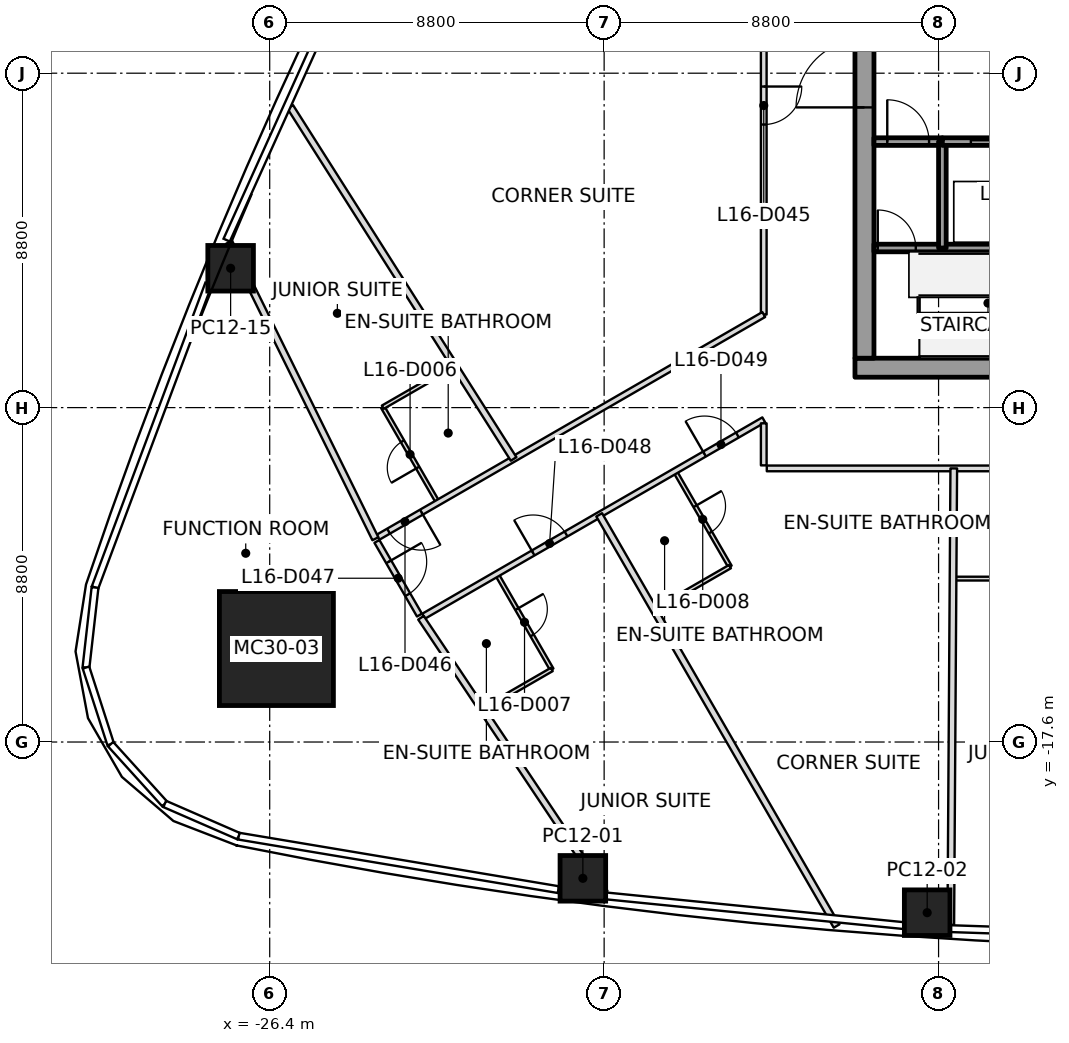
"""IFC4 building model, lengths in metres.
Left out: names, types, materials, properties, quantities, classifications, styles, units other than length and angle.
Written with IfcOpenShell. Run it as: python <this file> out.ifc"""

import sys

from ifc_helpers import new_model, si_unit, direction, frame, frame_2d, origin, origin_2d, place, context, subcontext, project, spatial, rectangle, extrude, clip, halfspace, element, fill, save


model = new_model("IFC4")
c1 = context("Model", 3, precision=1e-05, world=origin(), true_north=direction((0.0, 1.0)))
c2 = subcontext(c1, "Body", "Model", "MODEL_VIEW")
j1 = project(units=[si_unit("LENGTHUNIT", "METRE"), si_unit("PLANEANGLEUNIT", "RADIAN")], contexts=[c1])
p1 = place(None, origin())
s1 = spatial("IfcSite", under=j1, at=p1, CompositionType="ELEMENT")
p2 = place(p1, origin())
s2 = spatial("IfcBuilding", under=s1, at=p2, CompositionType="ELEMENT")
p3 = place(p2, frame((0.0, 0.0, 81.3)))
s3 = spatial("IfcBuildingStorey", under=s2, at=p3, CompositionType="ELEMENT", Elevation=81.3)
p4 = place(p3, frame((-26.224, -15.14, 0.0), z_axis=(0.030531992032, 0.017607001884, 0.999378702468), x_axis=(0.999533790055, -0.000537827582, -0.03052725469)))
e1 = element("IfcColumn", 1, at=p4, inside=s3, PredefinedType="COLUMN", context=c2, shape_type="SweptSolid", body=[
    extrude(rectangle(XDim=3.0, YDim=3.0, at=origin_2d()), origin(), (0.0, 0.0, 1.0), 3.702),
])
p5 = place(p3, frame((-18.16, -21.187, 0.0), z_axis=(0.019262752912, 0.011346553085, 0.999750069809), x_axis=(-0.991035318341, 0.132436881846, 0.017591763067)))
e2 = element("IfcColumn", 2, at=p5, inside=s3, PredefinedType="COLUMN", context=c2, shape_type="SweptSolid", body=[
    clip(extrude(rectangle(XDim=1.2, YDim=1.2, at=origin_2d()), origin(), (0.0, 0.0, 1.0), 3.701), halfspace(frame((0.0, 0.0, 0.008)), True)),
])
p6 = place(p3, frame((-9.1, -22.091, 0.0), z_axis=(0.009632635025, 0.012073782257, 0.999880710947), x_axis=(-0.997756100606, 0.066371190404, 0.008810720082)))
e3 = element("IfcColumn", 3, at=p6, inside=s3, PredefinedType="COLUMN", context=c2, shape_type="SweptSolid", body=[
    clip(extrude(rectangle(XDim=1.2, YDim=1.2, at=origin_2d()), origin(), (0.0, 0.0, 1.0), 3.7), halfspace(frame((0.0, 0.0, 0.009)), True)),
])
p7 = place(p3, frame((-27.428, -5.133, 0.0), z_axis=(0.019460669214, 0.010950749456, 0.999750650632), x_axis=(0.381024023637, 0.924398704075, -0.017542215233)))
e4 = element("IfcColumn", 4, at=p7, inside=s3, PredefinedType="COLUMN", context=c2, shape_type="SweptSolid", body=[
    extrude(rectangle(XDim=1.2, YDim=1.2, at=origin_2d()), origin(), (0.0, 0.0, 1.0), 3.701),
])
p8 = place(p3, frame((-11.0, -7.75, 0.0), z_axis=(0.0, 0.0, 1.0), x_axis=(1.0, 0.0, 0.0)))
e5 = element("IfcWall", 5, at=p8, inside=s3, PredefinedType="SHEAR", context=c2, shape_type="SweptSolid", body=[
    extrude(rectangle(XDim=22.0, YDim=0.5, at=frame_2d((11.0, 0.0))), origin(), (0.0, 0.0, 1.0), 3.7),
])
p9 = place(p8, frame((10.45, 0.0, 0.0)))
e6 = element("IfcOpeningElement", 6, at=p9, cuts=e5, PredefinedType="OPENING", context=c2, shape_type="SweptSolid", body=[
    extrude(rectangle(XDim=1.1, YDim=2.1, at=frame_2d((0.55, 1.05))), frame((0.0, 0.25, 0.0), z_axis=(0.0, -1.0, 0.0), x_axis=(1.0, 0.0, 0.0)), (0.0, 0.0, 1.0), 0.5),
])
p10 = place(p3, frame((-10.75, -7.5, 0.0), z_axis=(0.0, 0.0, 1.0), x_axis=(0.0, 1.0, 0.0)))
e7 = element("IfcWall", 7, at=p10, inside=s3, PredefinedType="SHEAR", context=c2, shape_type="SweptSolid", body=[
    extrude(rectangle(XDim=15.0, YDim=0.5, at=frame_2d((7.5, 0.0))), origin(), (0.0, 0.0, 1.0), 3.7),
])
p11 = place(p10, frame((6.6, 0.0, 0.0)))
e8 = element("IfcOpeningElement", 8, at=p11, cuts=e7, PredefinedType="OPENING", context=c2, shape_type="SweptSolid", body=[
    extrude(rectangle(XDim=1.8, YDim=2.1, at=frame_2d((0.9, 1.05))), frame((0.0, 0.25, 0.0), z_axis=(0.0, -1.0, 0.0), x_axis=(1.0, 0.0, 0.0)), (0.0, 0.0, 1.0), 0.5),
])
p12 = place(p3, frame((-10.5, -4.6, 0.0), z_axis=(0.0, 0.0, 1.0), x_axis=(1.0, 0.0, 0.0)))
e9 = element("IfcWall", 9, at=p12, inside=s3, PredefinedType="SOLIDWALL", context=c2, shape_type="SweptSolid", body=[
    extrude(rectangle(XDim=1.8, YDim=0.2, at=frame_2d((0.9, 0.0))), origin(), (0.0, 0.0, 1.0), 3.55),
])
p13 = place(p12, frame((0.1, 0.0, 0.0)))
e10 = element("IfcOpeningElement", 10, at=p13, cuts=e9, PredefinedType="OPENING", context=c2, shape_type="SweptSolid", body=[
    extrude(rectangle(XDim=1.0, YDim=2.1, at=frame_2d((0.5, 1.05))), frame((0.0, 0.1, 0.0), z_axis=(0.0, -1.0, 0.0), x_axis=(1.0, 0.0, 0.0)), (0.0, 0.0, 1.0), 0.2),
])
p14 = place(p3, frame((-10.5, -1.8, 0.0), z_axis=(0.0, 0.0, 1.0), x_axis=(1.0, 0.0, 0.0)))
e11 = element("IfcWall", 11, at=p14, inside=s3, PredefinedType="SOLIDWALL", context=c2, shape_type="SweptSolid", body=[
    extrude(rectangle(XDim=1.8, YDim=0.2, at=frame_2d((0.9, 0.0))), origin(), (0.0, 0.0, 1.0), 3.55),
])
p15 = place(p14, frame((0.35, 0.0, 0.0)))
e12 = element("IfcOpeningElement", 12, at=p15, cuts=e11, PredefinedType="OPENING", context=c2, shape_type="SweptSolid", body=[
    extrude(rectangle(XDim=1.1, YDim=2.1, at=frame_2d((0.55, 1.05))), frame((0.0, 0.1, 0.0), z_axis=(0.0, -1.0, 0.0), x_axis=(1.0, 0.0, 0.0)), (0.0, 0.0, 1.0), 0.2),
])
p16 = place(p3, frame((-8.7, -4.6, 0.0), z_axis=(0.0, 0.0, 1.0), x_axis=(1.0, 0.0, 0.0)))
e13 = element("IfcWall", 13, at=p16, inside=s3, PredefinedType="SOLIDWALL", context=c2, shape_type="SweptSolid", body=[
    extrude(rectangle(XDim=2.6, YDim=0.2, at=frame_2d((1.3, 0.0))), origin(), (0.0, 0.0, 1.0), 3.55),
])
p17 = place(p3, frame((-8.7, -4.6, 0.0), z_axis=(0.0, 0.0, 1.0), x_axis=(0.0, 1.0, 0.0)))
e14 = element("IfcWall", 14, at=p17, inside=s3, PredefinedType="SOLIDWALL", context=c2, shape_type="SweptSolid", body=[
    extrude(rectangle(XDim=2.8, YDim=0.2, at=frame_2d((1.4, 0.0))), origin(), (0.0, 0.0, 1.0), 3.55),
])
p18 = place(p3, frame((-8.7, -1.8, 0.0), z_axis=(0.0, 0.0, 1.0), x_axis=(1.0, 0.0, 0.0)))
e15 = element("IfcWall", 15, at=p18, inside=s3, PredefinedType="SOLIDWALL", context=c2, shape_type="SweptSolid", body=[
    extrude(rectangle(XDim=2.6, YDim=0.2, at=frame_2d((1.3, 0.0))), origin(), (0.0, 0.0, 1.0), 3.55),
])
p19 = place(p18, frame((0.75, 0.0, 0.0)))
e16 = element("IfcOpeningElement", 16, at=p19, cuts=e15, PredefinedType="OPENING", context=c2, shape_type="SweptSolid", body=[
    extrude(rectangle(XDim=1.1, YDim=2.1, at=frame_2d((0.55, 1.05))), frame((0.0, 0.1, 0.0), z_axis=(0.0, -1.0, 0.0), x_axis=(1.0, 0.0, 0.0)), (0.0, 0.0, 1.0), 0.2),
])
p20 = place(p3, frame((-23.619, -12.251, 0.0), z_axis=(0.0, 0.0, 1.0), x_axis=(-0.442324638578, 0.896855012868, 0.0)))
e17 = element("IfcWall", 17, at=p20, inside=s3, PredefinedType="PARTITIONING", context=c2, shape_type="SweptSolid", body=[
    extrude(rectangle(XDim=8.701, YDim=0.175, at=frame_2d((4.351, 0.0))), origin(), (0.0, 0.0, 1.0), 3.15),
])
p21 = place(p3, frame((-19.982, -10.151, 0.0), z_axis=(0.0, 0.0, 1.0), x_axis=(-0.535687161916, 0.844416523144, 0.0)))
e18 = element("IfcWall", 18, at=p21, inside=s3, PredefinedType="PARTITIONING", context=c2, shape_type="SweptSolid", body=[
    extrude(rectangle(XDim=10.972, YDim=0.175, at=frame_2d((5.486, 0.0))), origin(), (0.0, 0.0, 1.0), 2.934),
])
p22 = place(p3, frame((-17.586, -21.564, 0.0), z_axis=(0.0, 0.0, 1.0), x_axis=(-0.555535204136, 0.831493016787, 0.0)))
e19 = element("IfcWall", 19, at=p22, inside=s3, PredefinedType="PARTITIONING", context=c2, shape_type="SweptSolid", body=[
    extrude(rectangle(XDim=8.701, YDim=0.175, at=frame_2d((4.351, 0.0))), origin(), (0.0, 0.0, 1.0), 3.15),
])
p23 = place(p3, frame((-17.73, -11.622, 0.0), z_axis=(0.0, 0.0, 1.0), x_axis=(0.499991403274, -0.86603036705, 0.0)))
e20 = element("IfcWall", 20, at=p23, inside=s3, PredefinedType="PARTITIONING", context=c2, shape_type="SweptSolid", body=[
    extrude(rectangle(XDim=12.494, YDim=0.175, at=frame_2d((6.247, 0.0))), origin(), (0.0, 0.0, 1.0), 2.934),
])
p24 = place(p3, frame((-8.4, -10.4, 0.0), z_axis=(0.0, 0.0, 1.0), x_axis=(-0.006564899179, -0.999978450817, 0.0)))
e21 = element("IfcWall", 21, at=p24, inside=s3, PredefinedType="PARTITIONING", context=c2, shape_type="SweptSolid", body=[
    extrude(rectangle(XDim=12.012, YDim=0.175, at=frame_2d((6.006, 0.0))), origin(), (0.0, 0.0, 1.0), 2.934),
])
p25 = place(p3, frame((-23.579, -12.32, 0.0), z_axis=(0.0, 0.0, 1.0), x_axis=(0.49994888933, -0.866054910533, 0.0)))
e22 = element("IfcWall", 22, at=p25, inside=s3, PredefinedType="PARTITIONING", context=c2, shape_type="SweptSolid", body=[
    extrude(rectangle(XDim=2.24, YDim=0.15, at=frame_2d((1.12, 0.0))), origin(), (0.0, 0.0, 1.0), 2.797),
])
p26 = place(p25, frame((0.62, 0.0, 0.0)))
e23 = element("IfcOpeningElement", 23, at=p26, cuts=e22, PredefinedType="OPENING", context=c2, shape_type="SweptSolid", body=[
    extrude(rectangle(XDim=1.0, YDim=2.1, at=frame_2d((0.5, 1.05))), frame((0.0, 0.075, 0.0), z_axis=(0.0, -1.0, 0.0), x_axis=(1.0, 0.0, 0.0)), (0.0, 0.0, 1.0), 0.15),
])
p27 = place(p3, frame((-13.4, 10.32, 0.0), z_axis=(0.0, 0.0, 1.0), x_axis=(0.0, -1.0, 0.0)))
e24 = element("IfcWall", 24, at=p27, inside=s3, PredefinedType="PARTITIONING", context=c2, shape_type="SweptSolid", body=[
    extrude(rectangle(XDim=16.671, YDim=0.15, at=frame_2d((8.335, 0.0))), origin(), (0.0, 0.0, 1.0), 2.947),
])
p28 = place(p27, frame((1.095, 0.0, 0.0)))
e25 = element("IfcOpeningElement", 25, at=p28, cuts=e24, PredefinedType="OPENING", context=c2, shape_type="SweptSolid", body=[
    extrude(rectangle(XDim=1.0, YDim=2.1, at=frame_2d((0.5, 1.05))), frame((0.0, 0.075, 0.0), z_axis=(0.0, -1.0, 0.0), x_axis=(1.0, 0.0, 0.0)), (0.0, 0.0, 1.0), 0.15),
])
p29 = place(p27, frame((10.671, 0.0, 0.0)))
e26 = element("IfcOpeningElement", 26, at=p29, cuts=e24, PredefinedType="OPENING", context=c2, shape_type="SweptSolid", body=[
    extrude(rectangle(XDim=1.0, YDim=2.1, at=frame_2d((0.5, 1.05))), frame((0.0, 0.075, 0.0), z_axis=(0.0, -1.0, 0.0), x_axis=(1.0, 0.0, 0.0)), (0.0, 0.0, 1.0), 0.15),
])
p30 = place(p3, frame((-13.4, -6.351, 0.0), z_axis=(0.0, 0.0, 1.0), x_axis=(-0.866028447449, -0.499994728181, 0.0)))
e27 = element("IfcWall", 27, at=p30, inside=s3, PredefinedType="PARTITIONING", context=c2, shape_type="SweptSolid", body=[
    extrude(rectangle(XDim=11.72, YDim=0.15, at=frame_2d((5.86, 0.0))), origin(), (0.0, 0.0, 1.0), 2.947),
])
p31 = place(p30, frame((10.4, 0.0, 0.0)))
e28 = element("IfcOpeningElement", 28, at=p31, cuts=e27, PredefinedType="OPENING", context=c2, shape_type="SweptSolid", body=[
    extrude(rectangle(XDim=1.0, YDim=2.1, at=frame_2d((0.5, 1.05))), frame((0.0, 0.075, 0.0), z_axis=(0.0, -1.0, 0.0), x_axis=(1.0, 0.0, 0.0)), (0.0, 0.0, 1.0), 0.15),
])
p32 = place(p3, frame((-22.35, -14.29, 0.0), z_axis=(0.0, 0.0, 1.0), x_axis=(0.866021934756, 0.500006008485, 0.0)))
e29 = element("IfcWall", 29, at=p32, inside=s3, PredefinedType="PARTITIONING", context=c2, shape_type="SweptSolid", body=[
    extrude(rectangle(XDim=10.335, YDim=0.15, at=frame_2d((5.167, 0.0))), origin(), (0.0, 0.0, 1.0), 2.797),
])
p33 = place(p32, frame((3.327, 0.0, 0.0)))
e30 = element("IfcOpeningElement", 30, at=p33, cuts=e29, PredefinedType="OPENING", context=c2, shape_type="SweptSolid", body=[
    extrude(rectangle(XDim=1.0, YDim=2.1, at=frame_2d((0.5, 1.05))), frame((0.0, 0.075, 0.0), z_axis=(0.0, -1.0, 0.0), x_axis=(1.0, 0.0, 0.0)), (0.0, 0.0, 1.0), 0.15),
])
p34 = place(p32, frame((8.535, 0.0, 0.0)))
e31 = element("IfcOpeningElement", 31, at=p34, cuts=e29, PredefinedType="OPENING", context=c2, shape_type="SweptSolid", body=[
    extrude(rectangle(XDim=1.0, YDim=2.1, at=frame_2d((0.5, 1.05))), frame((0.0, 0.075, 0.0), z_axis=(0.0, -1.0, 0.0), x_axis=(1.0, 0.0, 0.0)), (0.0, 0.0, 1.0), 0.15),
])
p35 = place(p3, frame((-13.4, -9.214, 0.0), z_axis=(0.0, 0.0, 1.0), x_axis=(0.0, -1.0, 0.0)))
e32 = element("IfcWall", 32, at=p35, inside=s3, PredefinedType="PARTITIONING", context=c2, shape_type="SweptSolid", body=[
    extrude(rectangle(XDim=1.106, YDim=0.15, at=frame_2d((0.553, 0.0))), origin(), (0.0, 0.0, 1.0), 2.797),
])
p36 = place(p3, frame((-13.32, -10.4, 0.0), z_axis=(0.0, 0.0, 1.0), x_axis=(1.0, 0.0, 0.0)))
e33 = element("IfcWall", 33, at=p36, inside=s3, PredefinedType="PARTITIONING", context=c2, shape_type="SweptSolid", body=[
    extrude(rectangle(XDim=26.64, YDim=0.15, at=frame_2d((13.32, 0.0))), origin(), (0.0, 0.0, 1.0), 2.947),
])
p37 = place(p36, frame((7.72, 0.0, 0.0)))
e34 = element("IfcOpeningElement", 34, at=p37, cuts=e33, PredefinedType="OPENING", context=c2, shape_type="SweptSolid", body=[
    extrude(rectangle(XDim=1.0, YDim=2.1, at=frame_2d((0.5, 1.05))), frame((0.0, 0.075, 0.0), z_axis=(0.0, -1.0, 0.0), x_axis=(1.0, 0.0, 0.0)), (0.0, 0.0, 1.0), 0.15),
])
p38 = place(p36, frame((11.92, 0.0, 0.0)))
e35 = element("IfcOpeningElement", 35, at=p38, cuts=e33, PredefinedType="OPENING", context=c2, shape_type="SweptSolid", body=[
    extrude(rectangle(XDim=1.0, YDim=2.1, at=frame_2d((0.5, 1.05))), frame((0.0, 0.075, 0.0), z_axis=(0.0, -1.0, 0.0), x_axis=(1.0, 0.0, 0.0)), (0.0, 0.0, 1.0), 0.15),
])
p39 = place(p36, frame((16.52, 0.0, 0.0)))
e36 = element("IfcOpeningElement", 36, at=p39, cuts=e33, PredefinedType="OPENING", context=c2, shape_type="SweptSolid", body=[
    extrude(rectangle(XDim=1.0, YDim=2.1, at=frame_2d((0.5, 1.05))), frame((0.0, 0.075, 0.0), z_axis=(0.0, -1.0, 0.0), x_axis=(1.0, 0.0, 0.0)), (0.0, 0.0, 1.0), 0.15),
])
p40 = place(p36, frame((21.12, 0.0, 0.0)))
e37 = element("IfcOpeningElement", 37, at=p40, cuts=e33, PredefinedType="OPENING", context=c2, shape_type="SweptSolid", body=[
    extrude(rectangle(XDim=1.0, YDim=2.1, at=frame_2d((0.5, 1.05))), frame((0.0, 0.075, 0.0), z_axis=(0.0, -1.0, 0.0), x_axis=(1.0, 0.0, 0.0)), (0.0, 0.0, 1.0), 0.15),
])
p41 = place(p3, frame((-21.989, -11.275, 0.0), z_axis=(0.0, 0.0, 1.0), x_axis=(-0.499972835562, 0.866041086612, 0.0)))
e38 = element("IfcWall", 38, at=p41, inside=s3, PredefinedType="PARTITIONING", context=c2, shape_type="SweptSolid", body=[
    extrude(rectangle(XDim=2.87, YDim=0.1, at=frame_2d((1.435, 0.0))), origin(), (0.0, 0.0, 1.0), 3.15),
])
p42 = place(p41, frame((1.035, 0.0, 0.0)))
e39 = element("IfcOpeningElement", 39, at=p42, cuts=e38, PredefinedType="OPENING", context=c2, shape_type="SweptSolid", body=[
    extrude(rectangle(XDim=0.8, YDim=2.1, at=frame_2d((0.4, 1.05))), frame((0.0, 0.05, 0.0), z_axis=(0.0, -1.0, 0.0), x_axis=(1.0, 0.0, 0.0)), (0.0, 0.0, 1.0), 0.1),
])
p43 = place(p3, frame((-23.424, -8.79, 0.0), z_axis=(0.0, 0.0, 1.0), x_axis=(0.866017224141, 0.500014167291, 0.0)))
e40 = element("IfcWall", 40, at=p43, inside=s3, PredefinedType="PARTITIONING", context=c2, shape_type="SweptSolid", body=[
    extrude(rectangle(XDim=2.27, YDim=0.1, at=frame_2d((1.135, 0.0))), origin(), (0.0, 0.0, 1.0), 3.15),
])
p44 = place(p3, frame((-20.413, -13.206, 0.0), z_axis=(0.0, 0.0, 1.0), x_axis=(0.500036638401, -0.866004249561, 0.0)))
e41 = element("IfcWall", 41, at=p44, inside=s3, PredefinedType="PARTITIONING", context=c2, shape_type="SweptSolid", body=[
    extrude(rectangle(XDim=2.87, YDim=0.1, at=frame_2d((1.435, 0.0))), origin(), (0.0, 0.0, 1.0), 3.15),
])
p45 = place(p44, frame((1.035, 0.0, 0.0)))
e42 = element("IfcOpeningElement", 42, at=p45, cuts=e41, PredefinedType="OPENING", context=c2, shape_type="SweptSolid", body=[
    extrude(rectangle(XDim=0.8, YDim=2.1, at=frame_2d((0.4, 1.05))), frame((0.0, 0.05, 0.0), z_axis=(0.0, -1.0, 0.0), x_axis=(1.0, 0.0, 0.0)), (0.0, 0.0, 1.0), 0.1),
])
p46 = place(p3, frame((-18.978, -15.691, 0.0), z_axis=(0.0, 0.0, 1.0), x_axis=(-0.866017224141, -0.500014167291, 0.0)))
e43 = element("IfcWall", 43, at=p46, inside=s3, PredefinedType="PARTITIONING", context=c2, shape_type="SweptSolid", body=[
    extrude(rectangle(XDim=2.27, YDim=0.1, at=frame_2d((1.135, 0.0))), origin(), (0.0, 0.0, 1.0), 3.15),
])
p47 = place(p3, frame((-15.723, -10.498, 0.0), z_axis=(0.0, 0.0, 1.0), x_axis=(0.499999802827, -0.866025517622, 0.0)))
e44 = element("IfcWall", 44, at=p47, inside=s3, PredefinedType="PARTITIONING", context=c2, shape_type="SweptSolid", body=[
    extrude(rectangle(XDim=2.87, YDim=0.1, at=frame_2d((1.435, 0.0))), origin(), (0.0, 0.0, 1.0), 2.797),
])
p48 = place(p47, frame((1.035, 0.0, 0.0)))
e45 = element("IfcOpeningElement", 45, at=p48, cuts=e44, PredefinedType="OPENING", context=c2, shape_type="SweptSolid", body=[
    extrude(rectangle(XDim=0.8, YDim=2.1, at=frame_2d((0.4, 1.05))), frame((0.0, 0.05, 0.0), z_axis=(0.0, -1.0, 0.0), x_axis=(1.0, 0.0, 0.0)), (0.0, 0.0, 1.0), 0.1),
])
p49 = place(p3, frame((-14.288, -12.984, 0.0), z_axis=(0.0, 0.0, 1.0), x_axis=(-0.866017224141, -0.500014167291, 0.0)))
e46 = element("IfcWall", 46, at=p49, inside=s3, PredefinedType="PARTITIONING", context=c2, shape_type="SweptSolid", body=[
    extrude(rectangle(XDim=2.27, YDim=0.1, at=frame_2d((1.135, 0.0))), origin(), (0.0, 0.0, 1.0), 3.093),
])
p50 = place(p3, frame((-6.1, -13.3, 0.0), z_axis=(0.0, 0.0, 1.0), x_axis=(-1.0, 0.0, 0.0)))
e47 = element("IfcWall", 47, at=p50, inside=s3, PredefinedType="PARTITIONING", context=c2, shape_type="SweptSolid", body=[
    extrude(rectangle(XDim=2.27, YDim=0.1, at=frame_2d((1.135, 0.0))), origin(), (0.0, 0.0, 1.0), 3.15),
])
p51 = place(p29, origin())
e48 = element("IfcDoor", 48, at=p51, inside=s3, OperationType="SINGLE_SWING_RIGHT", PredefinedType="DOOR", context=c2, shape_type="SweptSolid", body=[
    extrude(rectangle(XDim=1.0, YDim=2.1, at=frame_2d((0.5, 1.05))), frame((0.0, 0.025, 0.0), z_axis=(0.0, -1.0, 0.0), x_axis=(1.0, 0.0, 0.0)), (0.0, 0.0, 1.0), 0.05),
])
fill(e26, e48)
p52 = place(p31, origin())
e49 = element("IfcDoor", 49, at=p52, inside=s3, OperationType="SINGLE_SWING_LEFT", PredefinedType="DOOR", context=c2, shape_type="SweptSolid", body=[
    extrude(rectangle(XDim=1.0, YDim=2.1, at=frame_2d((0.5, 1.05))), frame((0.0, 0.025, 0.0), z_axis=(0.0, -1.0, 0.0), x_axis=(1.0, 0.0, 0.0)), (0.0, 0.0, 1.0), 0.05),
])
fill(e28, e49)
p53 = place(p42, origin())
e50 = element("IfcDoor", 50, at=p53, inside=s3, OperationType="SINGLE_SWING_RIGHT", PredefinedType="DOOR", context=c2, shape_type="SweptSolid", body=[
    extrude(rectangle(XDim=0.8, YDim=2.1, at=frame_2d((0.4, 1.05))), frame((0.0, 0.025, 0.0), z_axis=(0.0, -1.0, 0.0), x_axis=(1.0, 0.0, 0.0)), (0.0, 0.0, 1.0), 0.05),
])
fill(e39, e50)
p54 = place(p26, origin())
e51 = element("IfcDoor", 51, at=p54, inside=s3, OperationType="SINGLE_SWING_RIGHT", PredefinedType="DOOR", context=c2, shape_type="SweptSolid", body=[
    extrude(rectangle(XDim=1.0, YDim=2.1, at=frame_2d((0.5, 1.05))), frame((0.0, 0.025, 0.0), z_axis=(0.0, -1.0, 0.0), x_axis=(1.0, 0.0, 0.0)), (0.0, 0.0, 1.0), 0.05),
])
fill(e23, e51)
p55 = place(p33, origin())
e52 = element("IfcDoor", 52, at=p55, inside=s3, OperationType="SINGLE_SWING_LEFT", PredefinedType="DOOR", context=c2, shape_type="SweptSolid", body=[
    extrude(rectangle(XDim=1.0, YDim=2.1, at=frame_2d((0.5, 1.05))), frame((0.0, 0.025, 0.0), z_axis=(0.0, -1.0, 0.0), x_axis=(1.0, 0.0, 0.0)), (0.0, 0.0, 1.0), 0.05),
])
fill(e30, e52)
p56 = place(p45, origin())
e53 = element("IfcDoor", 53, at=p56, inside=s3, OperationType="SINGLE_SWING_LEFT", PredefinedType="DOOR", context=c2, shape_type="SweptSolid", body=[
    extrude(rectangle(XDim=0.8, YDim=2.1, at=frame_2d((0.4, 1.05))), frame((0.0, 0.025, 0.0), z_axis=(0.0, -1.0, 0.0), x_axis=(1.0, 0.0, 0.0)), (0.0, 0.0, 1.0), 0.05),
])
fill(e42, e53)
p57 = place(p34, origin())
e54 = element("IfcDoor", 54, at=p57, inside=s3, OperationType="SINGLE_SWING_LEFT", PredefinedType="DOOR", context=c2, shape_type="SweptSolid", body=[
    extrude(rectangle(XDim=1.0, YDim=2.1, at=frame_2d((0.5, 1.05))), frame((0.0, 0.025, 0.0), z_axis=(0.0, -1.0, 0.0), x_axis=(1.0, 0.0, 0.0)), (0.0, 0.0, 1.0), 0.05),
])
fill(e31, e54)
p58 = place(p48, origin())
e55 = element("IfcDoor", 55, at=p58, inside=s3, OperationType="SINGLE_SWING_LEFT", PredefinedType="DOOR", context=c2, shape_type="SweptSolid", body=[
    extrude(rectangle(XDim=0.8, YDim=2.1, at=frame_2d((0.4, 1.05))), frame((0.0, 0.025, 0.0), z_axis=(0.0, -1.0, 0.0), x_axis=(1.0, 0.0, 0.0)), (0.0, 0.0, 1.0), 0.05),
])
fill(e45, e55)
p59 = place(p19, origin())
e56 = element("IfcDoor", 56, at=p59, inside=s3, OperationType="SLIDING_TO_RIGHT", PredefinedType="DOOR", context=c2, shape_type="SweptSolid", body=[
    extrude(rectangle(XDim=1.1, YDim=2.1, at=frame_2d((0.55, 1.05))), frame((0.0, 0.025, 0.0), z_axis=(0.0, -1.0, 0.0), x_axis=(1.0, 0.0, 0.0)), (0.0, 0.0, 1.0), 0.05),
])
fill(e16, e56)
p60 = place(p15, origin())
e57 = element("IfcDoor", 57, at=p60, inside=s3, OperationType="SINGLE_SWING_LEFT", PredefinedType="DOOR", context=c2, shape_type="SweptSolid", body=[
    extrude(rectangle(XDim=1.1, YDim=2.1, at=frame_2d((0.55, 1.05))), frame((0.0, 0.025, 0.0), z_axis=(0.0, -1.0, 0.0), x_axis=(1.0, 0.0, 0.0)), (0.0, 0.0, 1.0), 0.05),
])
fill(e12, e57)
p61 = place(p13, origin())
e58 = element("IfcDoor", 58, at=p61, inside=s3, OperationType="SINGLE_SWING_LEFT", PredefinedType="DOOR", context=c2, shape_type="SweptSolid", body=[
    extrude(rectangle(XDim=1.0, YDim=2.1, at=frame_2d((0.5, 1.05))), frame((0.0, 0.025, 0.0), z_axis=(0.0, -1.0, 0.0), x_axis=(1.0, 0.0, 0.0)), (0.0, 0.0, 1.0), 0.05),
])
fill(e10, e58)
p62 = place(p11, origin())
e59 = element("IfcDoor", 59, at=p62, inside=s3, OperationType="DOUBLE_DOOR_SINGLE_SWING", PredefinedType="DOOR", context=c2, shape_type="SweptSolid", body=[
    extrude(rectangle(XDim=1.8, YDim=2.1, at=frame_2d((0.9, 1.05))), frame((0.0, 0.025, 0.0), z_axis=(0.0, -1.0, 0.0), x_axis=(1.0, 0.0, 0.0)), (0.0, 0.0, 1.0), 0.05),
])
fill(e8, e59)
save(model, sys.argv[1])
